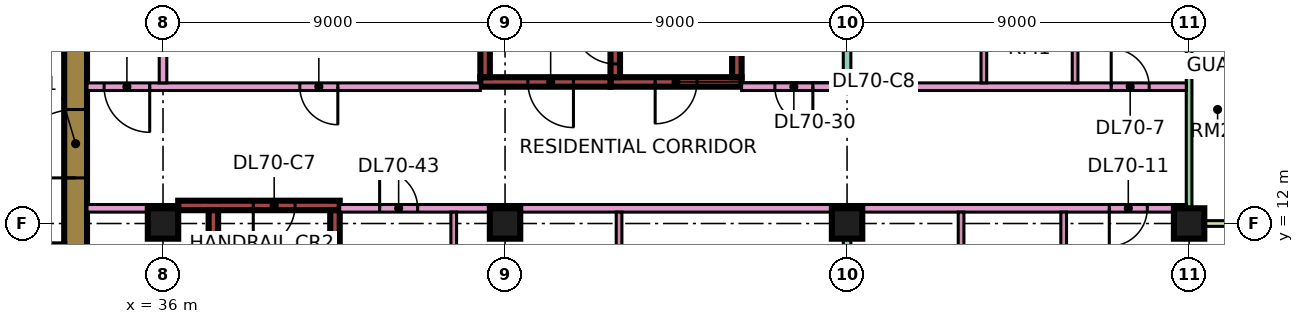
"""IFC4 building model, lengths in metres.
Left out: names, types, materials, properties, quantities, classifications, styles, units other than length and angle.
Written with IfcOpenShell. Run it as: python <this file> out.ifc"""

import sys

from ifc_helpers import new_model, si_unit, direction, frame, frame_2d, origin, origin_2d, place, context, subcontext, project, spatial, rectangle, extrude, element, fill, save


model = new_model("IFC4")
c1 = context("Model", 3, precision=1e-05, world=origin(), true_north=direction((0.0, 1.0)))
c2 = subcontext(c1, "Body", "Model", "MODEL_VIEW")
j1 = project(units=[si_unit("LENGTHUNIT", "METRE"), si_unit("PLANEANGLEUNIT", "RADIAN")], contexts=[c1])
p1 = place(None, origin())
s1 = spatial("IfcSite", under=j1, at=p1, CompositionType="ELEMENT")
p2 = place(p1, origin())
s2 = spatial("IfcBuilding", under=s1, at=p2, CompositionType="ELEMENT")
p3 = place(p2, frame((0.0, 0.0, 299.65)))
s3 = spatial("IfcBuildingStorey", under=s2, at=p3, CompositionType="ELEMENT", Elevation=299.65)
for number, where, z_axis, x_axis in (
    (1, (36.0, 12.0, 0.0), (0.0, 0.0, 1.0), (1.0, 0.0, 0.0)),
    (2, (45.0, 12.0, 0.0), (0.0, 0.0, 1.0), (1.0, 0.0, 0.0)),
    (3, (54.0, 12.0, 0.0), (0.0, 0.0, 1.0), (1.0, 0.0, 0.0)),
    (4, (63.0, 12.0, 0.0), (0.0, 0.0, 1.0), (1.0, 0.0, 0.0)),
):
    element("IfcColumn", number, at=place(p3, frame(where, z_axis=z_axis, x_axis=x_axis)), inside=s3, PredefinedType="COLUMN", context=c2, shape_type="SweptSolid", body=[
        extrude(rectangle(XDim=0.8, YDim=0.8, at=origin_2d()), origin(), (0.0, 0.0, 1.0), 3.75),
    ])
p4 = place(p3, frame((33.7, 7.6, 0.0), z_axis=(0.0, 0.0, 1.0), x_axis=(0.0, 1.0, 0.0)))
e5 = element("IfcWall", 5, at=p4, inside=s3, PredefinedType="SHEAR", context=c2, shape_type="SweptSolid", body=[
    extrude(rectangle(XDim=11.8, YDim=0.6, at=frame_2d((5.9, 0.0))), origin(), (0.0, 0.0, 1.0), 3.75),
])
p5 = place(p4, frame((5.6, 0.0, 0.0)))
e6 = element("IfcOpeningElement", 6, at=p5, cuts=e5, PredefinedType="OPENING", context=c2, shape_type="SweptSolid", body=[
    extrude(rectangle(XDim=1.8, YDim=2.4, at=frame_2d((0.9, 1.2))), frame((0.0, 0.31, 0.0), z_axis=(0.0, -1.0, 0.0), x_axis=(1.0, 0.0, 0.0)), (0.0, 0.0, 1.0), 0.62),
])
p6 = place(p3, frame((36.4, 12.475, 0.0), z_axis=(0.0, 0.0, 1.0), x_axis=(1.0, 0.0, 0.0)))
e7 = element("IfcWall", 7, at=p6, inside=s3, PredefinedType="SHEAR", context=c2, shape_type="SweptSolid", body=[
    extrude(rectangle(XDim=4.25, YDim=0.25, at=frame_2d((2.125, 0.0))), origin(), (0.0, 0.0, 1.0), 3.75),
])
p7 = place(p6, frame((1.975, 0.0, 0.0)))
e8 = element("IfcOpeningElement", 8, at=p7, cuts=e7, PredefinedType="OPENING", context=c2, shape_type="SweptSolid", body=[
    extrude(rectangle(XDim=1.1, YDim=2.2, at=frame_2d((0.55, 1.1))), frame((0.0, 0.135, 0.0), z_axis=(0.0, -1.0, 0.0), x_axis=(1.0, 0.0, 0.0)), (0.0, 0.0, 1.0), 0.27),
])
for number, where, z_axis, x_axis in (
    (9, (37.325, 5.85, 0.0), (0.0, 0.0, 1.0), (0.0, 1.0, 0.0)),
    (10, (40.525, 5.85, 0.0), (0.0, 0.0, 1.0), (0.0, 1.0, 0.0)),
):
    element("IfcWall", number, at=place(p3, frame(where, z_axis=z_axis, x_axis=x_axis)), inside=s3, PredefinedType="SHEAR", context=c2, shape_type="SweptSolid", body=[
        extrude(rectangle(XDim=6.5, YDim=0.25, at=frame_2d((3.25, 0.0))), origin(), (0.0, 0.0, 1.0), 3.75),
    ])
p8 = place(p3, frame((47.775, 15.725, 0.0), z_axis=(0.0, 0.0, 1.0), x_axis=(1.0, 0.0, 0.0)))
e11 = element("IfcWall", 11, at=p8, inside=s3, PredefinedType="SHEAR", context=c2, shape_type="SweptSolid", body=[
    extrude(rectangle(XDim=3.45, YDim=0.25, at=frame_2d((1.725, 0.0))), origin(), (0.0, 0.0, 1.0), 3.75),
])
p9 = place(p8, frame((1.175, 0.0, 0.0)))
e12 = element("IfcOpeningElement", 12, at=p9, cuts=e11, PredefinedType="OPENING", context=c2, shape_type="SweptSolid", body=[
    extrude(rectangle(XDim=1.1, YDim=2.2, at=frame_2d((0.55, 1.1))), frame((0.0, 0.135, 0.0), z_axis=(0.0, -1.0, 0.0), x_axis=(1.0, 0.0, 0.0)), (0.0, 0.0, 1.0), 0.27),
])
p10 = place(p3, frame((47.9, 15.85, 0.0), z_axis=(0.0, 0.0, 1.0), x_axis=(0.0, 1.0, 0.0)))
e13 = element("IfcWall", 13, at=p10, inside=s3, PredefinedType="SHEAR", context=c2, shape_type="SweptSolid", body=[
    extrude(rectangle(XDim=6.5, YDim=0.25, at=frame_2d((3.25, 0.0))), origin(), (0.0, 0.0, 1.0), 3.75),
])
p11 = place(p10, frame((0.35, 0.0, 0.0)))
e14 = element("IfcOpeningElement", 14, at=p11, cuts=e13, PredefinedType="OPENING", context=c2, shape_type="SweptSolid", body=[
    extrude(rectangle(XDim=1.1, YDim=2.2, at=frame_2d((0.55, 1.1))), frame((0.0, 0.135, 0.0), z_axis=(0.0, -1.0, 0.0), x_axis=(1.0, 0.0, 0.0)), (0.0, 0.0, 1.0), 0.27),
])
p12 = place(p3, frame((51.1, 15.85, 0.0), z_axis=(0.0, 0.0, 1.0), x_axis=(0.0, 1.0, 0.0)))
e15 = element("IfcWall", 15, at=p12, inside=s3, PredefinedType="SHEAR", context=c2, shape_type="SweptSolid", body=[
    extrude(rectangle(XDim=6.5, YDim=0.25, at=frame_2d((3.25, 0.0))), origin(), (0.0, 0.0, 1.0), 3.75),
])
p13 = place(p3, frame((44.35, 15.725, 0.0), z_axis=(0.0, 0.0, 1.0), x_axis=(1.0, 0.0, 0.0)))
e16 = element("IfcWall", 16, at=p13, inside=s3, PredefinedType="SHEAR", context=c2, shape_type="SweptSolid", body=[
    extrude(rectangle(XDim=3.425, YDim=0.25, at=frame_2d((1.712, 0.0))), origin(), (0.0, 0.0, 1.0), 3.75),
])
p14 = place(p13, frame((1.25, 0.0, 0.0)))
e17 = element("IfcOpeningElement", 17, at=p14, cuts=e16, PredefinedType="OPENING", context=c2, shape_type="SweptSolid", body=[
    extrude(rectangle(XDim=1.2, YDim=2.2, at=frame_2d((0.6, 1.1))), frame((0.0, 0.135, 0.0), z_axis=(0.0, -1.0, 0.0), x_axis=(1.0, 0.0, 0.0)), (0.0, 0.0, 1.0), 0.27),
])
p15 = place(p3, frame((44.475, 15.85, 0.0), z_axis=(0.0, 0.0, 1.0), x_axis=(0.0, 1.0, 0.0)))
e18 = element("IfcWall", 18, at=p15, inside=s3, PredefinedType="SHEAR", context=c2, shape_type="SweptSolid", body=[
    extrude(rectangle(XDim=6.5, YDim=0.25, at=frame_2d((3.25, 0.0))), origin(), (0.0, 0.0, 1.0), 3.75),
])
p16 = place(p15, frame((1.75, 0.0, 0.0)))
e19 = element("IfcOpeningElement", 19, at=p16, cuts=e18, PredefinedType="OPENING", context=c2, shape_type="SweptSolid", body=[
    extrude(rectangle(XDim=1.1, YDim=2.2, at=frame_2d((0.55, 1.1))), frame((0.0, 0.135, 0.0), z_axis=(0.0, -1.0, 0.0), x_axis=(1.0, 0.0, 0.0)), (0.0, 0.0, 1.0), 0.27),
])
p17 = place(p15, frame((4.3, 0.0, 0.0)))
e20 = element("IfcOpeningElement", 20, at=p17, cuts=e18, PredefinedType="OPENING", context=c2, shape_type="SweptSolid", body=[
    extrude(rectangle(XDim=1.1, YDim=2.2, at=frame_2d((0.55, 1.1))), frame((0.0, 0.135, 0.0), z_axis=(0.0, -1.0, 0.0), x_axis=(1.0, 0.0, 0.0)), (0.0, 0.0, 1.0), 0.27),
])
p18 = place(p3, frame((63.0, 12.075, 0.0), z_axis=(0.0, 0.0, 1.0), x_axis=(0.0, 1.0, 0.0)))
e21 = element("IfcWall", 21, at=p18, inside=s3, PredefinedType="SOLIDWALL", context=c2, shape_type="SweptSolid", body=[
    extrude(rectangle(XDim=10.35, YDim=0.15, at=frame_2d((5.175, 0.0))), origin(), (0.0, 0.0, 1.0), 3.35),
])
p19 = place(p18, frame((6.038, 0.0, 0.0)))
e22 = element("IfcOpeningElement", 22, at=p19, cuts=e21, PredefinedType="OPENING", context=c2, shape_type="SweptSolid", body=[
    extrude(rectangle(XDim=1.8, YDim=2.4, at=frame_2d((0.9, 1.2))), frame((0.0, 0.085, 0.0), z_axis=(0.0, -1.0, 0.0), x_axis=(1.0, 0.0, 0.0)), (0.0, 0.0, 1.0), 0.17),
])
p20 = place(p3, frame((64.5, 12.0, 0.0), z_axis=(0.0, 0.0, 1.0), x_axis=(-1.0, 0.0, 0.0)))
e23 = element("IfcWall", 23, at=p20, inside=s3, PredefinedType="SOLIDWALL", context=c2, shape_type="SweptSolid", body=[
    extrude(rectangle(XDim=1.5, YDim=0.15, at=frame_2d((0.75, 0.0))), origin(), (0.0, 0.0, 1.0), 3.35),
])
p21 = place(p3, frame((34.0, 12.4, 0.0), z_axis=(0.0, 0.0, 1.0), x_axis=(1.0, 0.0, 0.0)))
e24 = element("IfcWall", 24, at=p21, inside=s3, PredefinedType="PARTITIONING", context=c2, shape_type="SweptSolid", body=[
    extrude(rectangle(XDim=2.401, YDim=0.2, at=frame_2d((1.2, 0.0))), origin(), (0.0, 0.0, 1.0), 3.35),
])
p22 = place(p3, frame((34.0, 15.6, 0.0), z_axis=(0.0, 0.0, 1.0), x_axis=(1.0, 0.0, 0.0)))
e25 = element("IfcWall", 25, at=p22, inside=s3, PredefinedType="PARTITIONING", context=c2, shape_type="SweptSolid", body=[
    extrude(rectangle(XDim=10.35, YDim=0.2, at=frame_2d((5.175, 0.0))), origin(), (0.0, 0.0, 1.0), 3.35),
])
p23 = place(p22, frame((5.6, 0.0, 0.0)))
e26 = element("IfcOpeningElement", 26, at=p23, cuts=e25, PredefinedType="OPENING", context=c2, shape_type="SweptSolid", body=[
    extrude(rectangle(XDim=1.0, YDim=2.1, at=frame_2d((0.5, 1.05))), frame((0.0, 0.11, 0.0), z_axis=(0.0, -1.0, 0.0), x_axis=(1.0, 0.0, 0.0)), (0.0, 0.0, 1.0), 0.22),
])
p24 = place(p22, frame((0.45, 0.0, 0.0)))
e27 = element("IfcOpeningElement", 27, at=p24, cuts=e25, PredefinedType="OPENING", context=c2, shape_type="SweptSolid", body=[
    extrude(rectangle(XDim=1.2, YDim=2.1, at=frame_2d((0.6, 1.05))), frame((0.0, 0.11, 0.0), z_axis=(0.0, -1.0, 0.0), x_axis=(1.0, 0.0, 0.0)), (0.0, 0.0, 1.0), 0.22),
])
p25 = place(p3, frame((36.0, 15.7, 0.0), z_axis=(0.0, 0.0, 1.0), x_axis=(0.0, 1.0, 0.0)))
e28 = element("IfcWall", 28, at=p25, inside=s3, PredefinedType="PARTITIONING", context=c2, shape_type="SweptSolid", body=[
    extrude(rectangle(XDim=8.3, YDim=0.2, at=frame_2d((4.15, 0.0))), origin(), (0.0, 0.0, 1.0), 3.35),
])
p26 = place(p3, frame((40.65, 12.4, 0.0), z_axis=(0.0, 0.0, 1.0), x_axis=(1.0, 0.0, 0.0)))
e29 = element("IfcWall", 29, at=p26, inside=s3, PredefinedType="PARTITIONING", context=c2, shape_type="SweptSolid", body=[
    extrude(rectangle(XDim=22.276, YDim=0.2, at=frame_2d((11.138, 0.0))), origin(), (0.0, 0.0, 1.0), 3.35),
])
p27 = place(p26, frame((20.25, 0.0, 0.0)))
e30 = element("IfcOpeningElement", 30, at=p27, cuts=e29, PredefinedType="OPENING", context=c2, shape_type="SweptSolid", body=[
    extrude(rectangle(XDim=1.0, YDim=2.1, at=frame_2d((0.5, 1.05))), frame((0.0, 0.11, 0.0), z_axis=(0.0, -1.0, 0.0), x_axis=(1.0, 0.0, 0.0)), (0.0, 0.0, 1.0), 0.22),
])
p28 = place(p26, frame((1.05, 0.0, 0.0)))
e31 = element("IfcOpeningElement", 31, at=p28, cuts=e29, PredefinedType="OPENING", context=c2, shape_type="SweptSolid", body=[
    extrude(rectangle(XDim=1.0, YDim=2.1, at=frame_2d((0.5, 1.05))), frame((0.0, 0.11, 0.0), z_axis=(0.0, -1.0, 0.0), x_axis=(1.0, 0.0, 0.0)), (0.0, 0.0, 1.0), 0.22),
])
p29 = place(p3, frame((43.65, 5.975, 0.0), z_axis=(0.0, 0.0, 1.0), x_axis=(0.0, 1.0, 0.0)))
e32 = element("IfcWall", 32, at=p29, inside=s3, PredefinedType="PARTITIONING", context=c2, shape_type="SweptSolid", body=[
    extrude(rectangle(XDim=6.325, YDim=0.15, at=frame_2d((3.163, 0.0))), origin(), (0.0, 0.0, 1.0), 3.35),
])
p30 = place(p29, frame((4.275, 0.0, 0.0)))
e33 = element("IfcOpeningElement", 33, at=p30, cuts=e32, PredefinedType="OPENING", context=c2, shape_type="SweptSolid", body=[
    extrude(rectangle(XDim=0.9, YDim=2.1, at=frame_2d((0.45, 1.05))), frame((0.0, 0.085, 0.0), z_axis=(0.0, -1.0, 0.0), x_axis=(1.0, 0.0, 0.0)), (0.0, 0.0, 1.0), 0.17),
])
p31 = place(p3, frame((48.0, 5.975, 0.0), z_axis=(0.0, 0.0, 1.0), x_axis=(0.0, 1.0, 0.0)))
e34 = element("IfcWall", 34, at=p31, inside=s3, PredefinedType="PARTITIONING", context=c2, shape_type="SweptSolid", body=[
    extrude(rectangle(XDim=6.325, YDim=0.15, at=frame_2d((3.163, 0.0))), origin(), (0.0, 0.0, 1.0), 3.35),
])
p32 = place(p3, frame((51.225, 15.6, 0.0), z_axis=(0.0, 0.0, 1.0), x_axis=(1.0, 0.0, 0.0)))
e35 = element("IfcWall", 35, at=p32, inside=s3, PredefinedType="PARTITIONING", context=c2, shape_type="SweptSolid", body=[
    extrude(rectangle(XDim=11.701, YDim=0.2, at=frame_2d((5.851, 0.0))), origin(), (0.0, 0.0, 1.0), 3.35),
])
p33 = place(p32, frame((9.725, 0.0, 0.0)))
e36 = element("IfcOpeningElement", 36, at=p33, cuts=e35, PredefinedType="OPENING", context=c2, shape_type="SweptSolid", body=[
    extrude(rectangle(XDim=1.0, YDim=2.1, at=frame_2d((0.5, 1.05))), frame((0.0, 0.11, 0.0), z_axis=(0.0, -1.0, 0.0), x_axis=(1.0, 0.0, 0.0)), (0.0, 0.0, 1.0), 0.22),
])
p34 = place(p32, frame((0.875, 0.0, 0.0)))
e37 = element("IfcOpeningElement", 37, at=p34, cuts=e35, PredefinedType="OPENING", context=c2, shape_type="SweptSolid", body=[
    extrude(rectangle(XDim=1.0, YDim=2.1, at=frame_2d((0.5, 1.05))), frame((0.0, 0.11, 0.0), z_axis=(0.0, -1.0, 0.0), x_axis=(1.0, 0.0, 0.0)), (0.0, 0.0, 1.0), 0.22),
])
p35 = place(p3, frame((54.0, 5.825, 0.0), z_axis=(0.0, 0.0, 1.0), x_axis=(0.0, 1.0, 0.0)))
e38 = element("IfcWall", 38, at=p35, inside=s3, PredefinedType="PARTITIONING", context=c2, shape_type="SweptSolid", body=[
    extrude(rectangle(XDim=6.475, YDim=0.2, at=frame_2d((3.238, 0.0))), origin(), (0.0, 0.0, 1.0), 3.35),
])
p36 = place(p3, frame((54.0, 15.7, 0.0), z_axis=(0.0, 0.0, 1.0), x_axis=(0.0, 1.0, 0.0)))
e39 = element("IfcWall", 39, at=p36, inside=s3, PredefinedType="PARTITIONING", context=c2, shape_type="SweptSolid", body=[
    extrude(rectangle(XDim=8.3, YDim=0.2, at=frame_2d((4.15, 0.0))), origin(), (0.0, 0.0, 1.0), 3.35),
])
p37 = place(p3, frame((57.0, 7.075, 0.0), z_axis=(0.0, 0.0, 1.0), x_axis=(0.0, 1.0, 0.0)))
e40 = element("IfcWall", 40, at=p37, inside=s3, PredefinedType="PARTITIONING", context=c2, shape_type="SweptSolid", body=[
    extrude(rectangle(XDim=5.225, YDim=0.15, at=frame_2d((2.613, 0.0))), origin(), (0.0, 0.0, 1.0), 3.35),
])
p38 = place(p3, frame((57.6, 15.7, 0.0), z_axis=(0.0, 0.0, 1.0), x_axis=(0.0, 1.0, 0.0)))
e41 = element("IfcWall", 41, at=p38, inside=s3, PredefinedType="PARTITIONING", context=c2, shape_type="SweptSolid", body=[
    extrude(rectangle(XDim=2.825, YDim=0.15, at=frame_2d((1.413, 0.0))), origin(), (0.0, 0.0, 1.0), 3.35),
])
p39 = place(p3, frame((59.7, 7.075, 0.0), z_axis=(0.0, 0.0, 1.0), x_axis=(0.0, 1.0, 0.0)))
e42 = element("IfcWall", 42, at=p39, inside=s3, PredefinedType="PARTITIONING", context=c2, shape_type="SweptSolid", body=[
    extrude(rectangle(XDim=5.225, YDim=0.15, at=frame_2d((2.613, 0.0))), origin(), (0.0, 0.0, 1.0), 3.35),
])
p40 = place(p39, frame((2.275, 0.0, 0.0)))
e43 = element("IfcOpeningElement", 43, at=p40, cuts=e42, PredefinedType="OPENING", context=c2, shape_type="SweptSolid", body=[
    extrude(rectangle(XDim=0.8, YDim=2.1, at=frame_2d((0.4, 1.05))), frame((0.0, 0.085, 0.0), z_axis=(0.0, -1.0, 0.0), x_axis=(1.0, 0.0, 0.0)), (0.0, 0.0, 1.0), 0.17),
])
p41 = place(p3, frame((60.0, 15.7, 0.0), z_axis=(0.0, 0.0, 1.0), x_axis=(0.0, 1.0, 0.0)))
e44 = element("IfcWall", 44, at=p41, inside=s3, PredefinedType="PARTITIONING", context=c2, shape_type="SweptSolid", body=[
    extrude(rectangle(XDim=2.825, YDim=0.15, at=frame_2d((1.413, 0.0))), origin(), (0.0, 0.0, 1.0), 3.35),
])
p42 = place(p5, origin())
e45 = element("IfcDoor", 45, at=p42, inside=s3, OperationType="DOUBLE_DOOR_SINGLE_SWING", PredefinedType="DOOR", context=c2, shape_type="SweptSolid", body=[
    extrude(rectangle(XDim=1.8, YDim=2.4, at=frame_2d((0.9, 1.2))), frame((0.0, 0.025, 0.0), z_axis=(0.0, -1.0, 0.0), x_axis=(1.0, 0.0, 0.0)), (0.0, 0.0, 1.0), 0.05),
])
fill(e6, e45)
p43 = place(p7, frame((1.1, 0.0, 0.0), z_axis=(0.0, 0.0, 1.0), x_axis=(-1.0, 0.0, 0.0)))
e46 = element("IfcDoor", 46, at=p43, inside=s3, OperationType="SINGLE_SWING_LEFT", PredefinedType="DOOR", context=c2, shape_type="SweptSolid", body=[
    extrude(rectangle(XDim=1.1, YDim=2.2, at=frame_2d((0.55, 1.1))), frame((0.0, 0.025, 0.0), z_axis=(0.0, -1.0, 0.0), x_axis=(1.0, 0.0, 0.0)), (0.0, 0.0, 1.0), 0.05),
])
fill(e8, e46)
p44 = place(p9, frame((1.1, 0.0, 0.0), z_axis=(0.0, 0.0, 1.0), x_axis=(-1.0, 0.0, 0.0)))
e47 = element("IfcDoor", 47, at=p44, inside=s3, OperationType="SINGLE_SWING_LEFT", PredefinedType="DOOR", context=c2, shape_type="SweptSolid", body=[
    extrude(rectangle(XDim=1.1, YDim=2.2, at=frame_2d((0.55, 1.1))), frame((0.0, 0.025, 0.0), z_axis=(0.0, -1.0, 0.0), x_axis=(1.0, 0.0, 0.0)), (0.0, 0.0, 1.0), 0.05),
])
fill(e12, e47)
p45 = place(p14, origin())
e48 = element("IfcDoor", 48, at=p45, inside=s3, OperationType="SINGLE_SWING_RIGHT", PredefinedType="DOOR", context=c2, shape_type="SweptSolid", body=[
    extrude(rectangle(XDim=1.2, YDim=2.2, at=frame_2d((0.6, 1.1))), frame((0.0, 0.025, 0.0), z_axis=(0.0, -1.0, 0.0), x_axis=(1.0, 0.0, 0.0)), (0.0, 0.0, 1.0), 0.05),
])
fill(e17, e48)
p46 = place(p11, frame((1.1, 0.0, 0.0), z_axis=(0.0, 0.0, 1.0), x_axis=(-1.0, 0.0, 0.0)))
e49 = element("IfcDoor", 49, at=p46, inside=s3, OperationType="SINGLE_SWING_RIGHT", PredefinedType="DOOR", context=c2, shape_type="SweptSolid", body=[
    extrude(rectangle(XDim=1.1, YDim=2.2, at=frame_2d((0.55, 1.1))), frame((0.0, 0.025, 0.0), z_axis=(0.0, -1.0, 0.0), x_axis=(1.0, 0.0, 0.0)), (0.0, 0.0, 1.0), 0.05),
])
fill(e14, e49)
p47 = place(p23, origin())
e50 = element("IfcDoor", 50, at=p47, inside=s3, OperationType="SINGLE_SWING_RIGHT", PredefinedType="DOOR", context=c2, shape_type="SweptSolid", body=[
    extrude(rectangle(XDim=1.0, YDim=2.1, at=frame_2d((0.5, 1.05))), frame((0.0, 0.025, 0.0), z_axis=(0.0, -1.0, 0.0), x_axis=(1.0, 0.0, 0.0)), (0.0, 0.0, 1.0), 0.05),
])
fill(e26, e50)
p48 = place(p33, origin())
e51 = element("IfcDoor", 51, at=p48, inside=s3, OperationType="SINGLE_SWING_LEFT", PredefinedType="DOOR", context=c2, shape_type="SweptSolid", body=[
    extrude(rectangle(XDim=1.0, YDim=2.1, at=frame_2d((0.5, 1.05))), frame((0.0, 0.025, 0.0), z_axis=(0.0, -1.0, 0.0), x_axis=(1.0, 0.0, 0.0)), (0.0, 0.0, 1.0), 0.05),
])
fill(e36, e51)
p49 = place(p27, frame((1.0, 0.0, 0.0), z_axis=(0.0, 0.0, 1.0), x_axis=(-1.0, 0.0, 0.0)))
e52 = element("IfcDoor", 52, at=p49, inside=s3, OperationType="SINGLE_SWING_LEFT", PredefinedType="DOOR", context=c2, shape_type="SweptSolid", body=[
    extrude(rectangle(XDim=1.0, YDim=2.1, at=frame_2d((0.5, 1.05))), frame((0.0, 0.025, 0.0), z_axis=(0.0, -1.0, 0.0), x_axis=(1.0, 0.0, 0.0)), (0.0, 0.0, 1.0), 0.05),
])
fill(e30, e52)
p50 = place(p24, origin())
e53 = element("IfcDoor", 53, at=p50, inside=s3, OperationType="SINGLE_SWING_RIGHT", PredefinedType="DOOR", context=c2, shape_type="SweptSolid", body=[
    extrude(rectangle(XDim=1.2, YDim=2.1, at=frame_2d((0.6, 1.05))), frame((0.0, 0.025, 0.0), z_axis=(0.0, -1.0, 0.0), x_axis=(1.0, 0.0, 0.0)), (0.0, 0.0, 1.0), 0.05),
])
fill(e27, e53)
p51 = place(p34, origin())
e54 = element("IfcDoor", 54, at=p51, inside=s3, OperationType="SINGLE_SWING_RIGHT", PredefinedType="DOOR", context=c2, shape_type="SweptSolid", body=[
    extrude(rectangle(XDim=1.0, YDim=2.1, at=frame_2d((0.5, 1.05))), frame((0.0, 0.025, 0.0), z_axis=(0.0, -1.0, 0.0), x_axis=(1.0, 0.0, 0.0)), (0.0, 0.0, 1.0), 0.05),
])
fill(e37, e54)
p52 = place(p28, origin())
e55 = element("IfcDoor", 55, at=p52, inside=s3, OperationType="SINGLE_SWING_LEFT", PredefinedType="DOOR", context=c2, shape_type="SweptSolid", body=[
    extrude(rectangle(XDim=1.0, YDim=2.1, at=frame_2d((0.5, 1.05))), frame((0.0, 0.025, 0.0), z_axis=(0.0, -1.0, 0.0), x_axis=(1.0, 0.0, 0.0)), (0.0, 0.0, 1.0), 0.05),
])
fill(e31, e55)
save(model, sys.argv[1])
